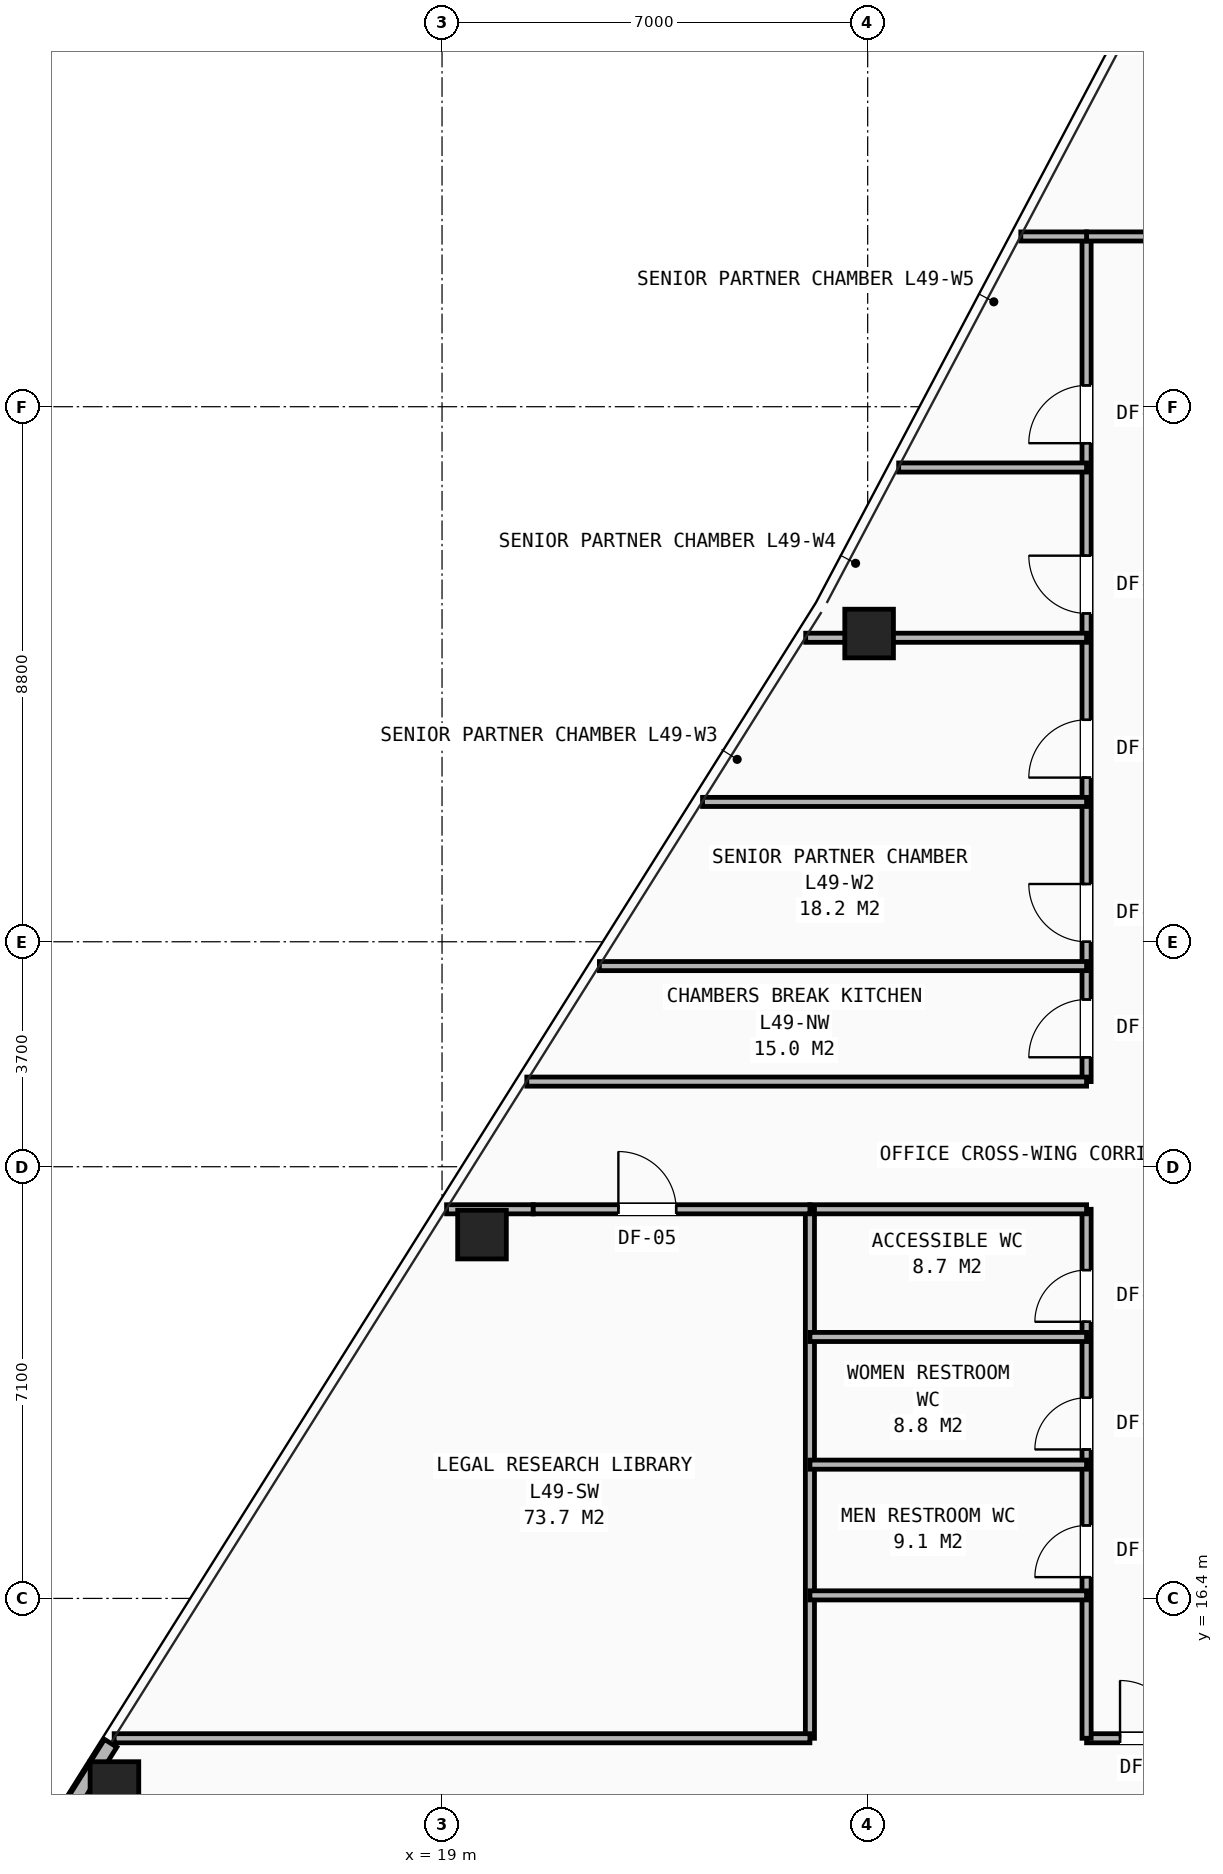
"""IFC4 building model, lengths in metres.
Left out: names, types, materials, properties, quantities, classifications, styles, units other than length and angle.
Written with IfcOpenShell. Run it as: python <this file> out.ifc"""

import sys

from ifc_helpers import new_model, si_unit, direction, frame, frame_2d, origin, origin_2d, place, context, subcontext, project, spatial, rectangle, hollow_rectangle, extrude, element, fill, save


model = new_model("IFC4")
c1 = context("Model", 3, precision=1e-05, world=origin(), true_north=direction((0.0, 1.0)))
c2 = subcontext(c1, "Body", "Model", "MODEL_VIEW")
j1 = project(units=[si_unit("LENGTHUNIT", "METRE"), si_unit("PLANEANGLEUNIT", "RADIAN")], contexts=[c1])
p1 = place(None, origin())
s1 = spatial("IfcSite", under=j1, at=p1, CompositionType="ELEMENT")
p2 = place(p1, origin())
s2 = spatial("IfcBuilding", under=s1, at=p2, CompositionType="ELEMENT")
p3 = place(p2, frame((0.0, 0.0, 172.35)))
s3 = spatial("IfcBuildingStorey", under=s2, at=p3, CompositionType="ELEMENT", Elevation=172.35)
for number, where, z_axis, x_axis in (
    (1, (26.024, 32.269, 0.0), (0.0, 0.0, 1.0), (1.0, 0.0, 0.0)),
    (2, (19.657, 22.384, 0.0), (0.0, 0.0, 1.0), (1.0, 0.0, 0.0)),
    (3, (13.612, 13.314, 0.0), (0.0, 0.0, 1.0), (1.0, 0.0, 0.0)),
):
    element("IfcColumn", number, at=place(p3, frame(where, z_axis=z_axis, x_axis=x_axis)), inside=s3, PredefinedType="COLUMN", context=c2, shape_type="SweptSolid", body=[
        extrude(hollow_rectangle(XDim=0.8, YDim=0.8, WallThickness=0.055, at=origin_2d()), origin(), (0.0, 0.0, 1.0), 3.45),
    ])
p4 = place(p3, frame((13.551, 14.018, 0.0), z_axis=(0.0, 0.0, 1.0), x_axis=(-0.532008789028, -0.84673883128, 0.0)))
e4 = element("IfcWall", 4, at=p4, inside=s3, PredefinedType="SHEAR", context=c2, shape_type="SweptSolid", body=[
    extrude(rectangle(XDim=1.167, YDim=0.24, at=frame_2d((0.584, 0.0))), origin(), (0.0, 0.0, 1.0), 2.583),
])
p5 = place(p3, frame((29.6, 14.1, 0.0), z_axis=(0.0, 0.0, 1.0), x_axis=(1.0, 0.0, 0.0)))
e5 = element("IfcWall", 5, at=p5, inside=s3, PredefinedType="PARTITIONING", context=c2, shape_type="SweptSolid", body=[
    extrude(rectangle(XDim=18.6, YDim=0.15, at=frame_2d((9.3, 0.0))), origin(), (0.0, 0.0, 1.0), 2.252),
])
p6 = place(p5, frame((0.55, 0.0, 0.0)))
e6 = element("IfcOpeningElement", 6, at=p6, cuts=e5, PredefinedType="OPENING", context=c2, shape_type="SweptSolid", body=[
    extrude(rectangle(XDim=0.95, YDim=2.1, at=frame_2d((0.475, 1.05))), frame((0.0, 0.085, 0.0), z_axis=(0.0, -1.0, 0.0), x_axis=(1.0, 0.0, 0.0)), (0.0, 0.0, 1.0), 0.17),
])
p7 = place(p5, frame((2.25, 0.0, 0.0)))
e7 = element("IfcOpeningElement", 7, at=p7, cuts=e5, PredefinedType="OPENING", context=c2, shape_type="SweptSolid", body=[
    extrude(rectangle(XDim=0.95, YDim=2.1, at=frame_2d((0.475, 1.05))), frame((0.0, 0.085, 0.0), z_axis=(0.0, -1.0, 0.0), x_axis=(1.0, 0.0, 0.0)), (0.0, 0.0, 1.0), 0.17),
])
p8 = place(p5, frame((5.95, 0.0, 0.0)))
e8 = element("IfcOpeningElement", 8, at=p8, cuts=e5, PredefinedType="OPENING", context=c2, shape_type="SweptSolid", body=[
    extrude(rectangle(XDim=0.95, YDim=2.1, at=frame_2d((0.475, 1.05))), frame((0.0, 0.085, 0.0), z_axis=(0.0, -1.0, 0.0), x_axis=(1.0, 0.0, 0.0)), (0.0, 0.0, 1.0), 0.17),
])
p9 = place(p5, frame((9.75, 0.0, 0.0)))
e9 = element("IfcOpeningElement", 9, at=p9, cuts=e5, PredefinedType="OPENING", context=c2, shape_type="SweptSolid", body=[
    extrude(rectangle(XDim=0.95, YDim=2.1, at=frame_2d((0.475, 1.05))), frame((0.0, 0.085, 0.0), z_axis=(0.0, -1.0, 0.0), x_axis=(1.0, 0.0, 0.0)), (0.0, 0.0, 1.0), 0.17),
])
p10 = place(p5, frame((13.55, 0.0, 0.0)))
e10 = element("IfcOpeningElement", 10, at=p10, cuts=e5, PredefinedType="OPENING", context=c2, shape_type="SweptSolid", body=[
    extrude(rectangle(XDim=0.95, YDim=2.1, at=frame_2d((0.475, 1.05))), frame((0.0, 0.085, 0.0), z_axis=(0.0, -1.0, 0.0), x_axis=(1.0, 0.0, 0.0)), (0.0, 0.0, 1.0), 0.17),
])
p11 = place(p5, frame((16.95, 0.0, 0.0)))
e11 = element("IfcOpeningElement", 11, at=p11, cuts=e5, PredefinedType="OPENING", context=c2, shape_type="SweptSolid", body=[
    extrude(rectangle(XDim=0.95, YDim=2.1, at=frame_2d((0.475, 1.05))), frame((0.0, 0.085, 0.0), z_axis=(0.0, -1.0, 0.0), x_axis=(1.0, 0.0, 0.0)), (0.0, 0.0, 1.0), 0.17),
])
p12 = place(p3, frame((29.6, 14.1, 0.0), z_axis=(0.0, 0.0, 1.0), x_axis=(0.0, 1.0, 0.0)))
e12 = element("IfcWall", 12, at=p12, inside=s3, PredefinedType="PARTITIONING", context=c2, shape_type="SweptSolid", body=[
    extrude(rectangle(XDim=8.7, YDim=0.15, at=frame_2d((4.35, 0.0))), origin(), (0.0, 0.0, 1.0), 3.21),
])
p13 = place(p12, frame((2.65, 0.0, 0.0)))
e13 = element("IfcOpeningElement", 13, at=p13, cuts=e12, PredefinedType="OPENING", context=c2, shape_type="SweptSolid", body=[
    extrude(rectangle(XDim=0.85, YDim=2.05, at=frame_2d((0.425, 1.025))), frame((0.0, 0.085, 0.0), z_axis=(0.0, -1.0, 0.0), x_axis=(1.0, 0.0, 0.0)), (0.0, 0.0, 1.0), 0.17),
])
p14 = place(p12, frame((4.75, 0.0, 0.0)))
e14 = element("IfcOpeningElement", 14, at=p14, cuts=e12, PredefinedType="OPENING", context=c2, shape_type="SweptSolid", body=[
    extrude(rectangle(XDim=0.85, YDim=2.05, at=frame_2d((0.425, 1.025))), frame((0.0, 0.085, 0.0), z_axis=(0.0, -1.0, 0.0), x_axis=(1.0, 0.0, 0.0)), (0.0, 0.0, 1.0), 0.17),
])
p15 = place(p12, frame((6.85, 0.0, 0.0)))
e15 = element("IfcOpeningElement", 15, at=p15, cuts=e12, PredefinedType="OPENING", context=c2, shape_type="SweptSolid", body=[
    extrude(rectangle(XDim=0.85, YDim=2.05, at=frame_2d((0.425, 1.025))), frame((0.0, 0.085, 0.0), z_axis=(0.0, -1.0, 0.0), x_axis=(1.0, 0.0, 0.0)), (0.0, 0.0, 1.0), 0.17),
])
p16 = place(p3, frame((29.6, 24.9, 0.0), z_axis=(0.0, 0.0, 1.0), x_axis=(0.0, 1.0, 0.0)))
e16 = element("IfcWall", 16, at=p16, inside=s3, PredefinedType="PARTITIONING", context=c2, shape_type="SweptSolid", body=[
    extrude(rectangle(XDim=13.9, YDim=0.15, at=frame_2d((6.95, 0.0))), origin(), (0.0, 0.0, 1.0), 2.252),
])
p17 = place(p16, frame((0.4, 0.0, 0.0)))
e17 = element("IfcOpeningElement", 17, at=p17, cuts=e16, PredefinedType="OPENING", context=c2, shape_type="SweptSolid", body=[
    extrude(rectangle(XDim=0.95, YDim=2.1, at=frame_2d((0.475, 1.05))), frame((0.0, 0.085, 0.0), z_axis=(0.0, -1.0, 0.0), x_axis=(1.0, 0.0, 0.0)), (0.0, 0.0, 1.0), 0.17),
])
p18 = place(p16, frame((2.3, 0.0, 0.0)))
e18 = element("IfcOpeningElement", 18, at=p18, cuts=e16, PredefinedType="OPENING", context=c2, shape_type="SweptSolid", body=[
    extrude(rectangle(XDim=0.95, YDim=2.1, at=frame_2d((0.475, 1.05))), frame((0.0, 0.085, 0.0), z_axis=(0.0, -1.0, 0.0), x_axis=(1.0, 0.0, 0.0)), (0.0, 0.0, 1.0), 0.17),
])
p19 = place(p16, frame((5.0, 0.0, 0.0)))
e19 = element("IfcOpeningElement", 19, at=p19, cuts=e16, PredefinedType="OPENING", context=c2, shape_type="SweptSolid", body=[
    extrude(rectangle(XDim=0.95, YDim=2.1, at=frame_2d((0.475, 1.05))), frame((0.0, 0.085, 0.0), z_axis=(0.0, -1.0, 0.0), x_axis=(1.0, 0.0, 0.0)), (0.0, 0.0, 1.0), 0.17),
])
p20 = place(p16, frame((7.7, 0.0, 0.0)))
e20 = element("IfcOpeningElement", 20, at=p20, cuts=e16, PredefinedType="OPENING", context=c2, shape_type="SweptSolid", body=[
    extrude(rectangle(XDim=0.95, YDim=2.1, at=frame_2d((0.475, 1.05))), frame((0.0, 0.085, 0.0), z_axis=(0.0, -1.0, 0.0), x_axis=(1.0, 0.0, 0.0)), (0.0, 0.0, 1.0), 0.17),
])
p21 = place(p16, frame((10.5, 0.0, 0.0)))
e21 = element("IfcOpeningElement", 21, at=p21, cuts=e16, PredefinedType="OPENING", context=c2, shape_type="SweptSolid", body=[
    extrude(rectangle(XDim=0.95, YDim=2.1, at=frame_2d((0.475, 1.05))), frame((0.0, 0.085, 0.0), z_axis=(0.0, -1.0, 0.0), x_axis=(1.0, 0.0, 0.0)), (0.0, 0.0, 1.0), 0.17),
])
p22 = place(p3, frame((29.6, 38.8, 0.0), z_axis=(0.0, 0.0, 1.0), x_axis=(1.0, 0.0, 0.0)))
e22 = element("IfcWall", 22, at=p22, inside=s3, PredefinedType="PARTITIONING", context=c2, shape_type="SweptSolid", body=[
    extrude(rectangle(XDim=2.2, YDim=0.15, at=frame_2d((1.1, 0.0))), origin(), (0.0, 0.0, 1.0), 2.589),
])
p23 = place(p3, frame((19.074, 22.8, 0.0), z_axis=(0.0, 0.0, 1.0), x_axis=(1.0, 0.0, 0.0)))
e23 = element("IfcWall", 23, at=p23, inside=s3, PredefinedType="PARTITIONING", context=c2, shape_type="SweptSolid", body=[
    extrude(rectangle(XDim=1.426, YDim=0.15, at=frame_2d((0.713, 0.0))), origin(), (0.0, 0.0, 1.0), 2.589),
])
p24 = place(p3, frame((25.05, 22.8, 0.0), z_axis=(0.0, 0.0, 1.0), x_axis=(1.0, 0.0, 0.0)))
e24 = element("IfcWall", 24, at=p24, inside=s3, PredefinedType="PARTITIONING", context=c2, shape_type="SweptSolid", body=[
    extrude(rectangle(XDim=4.55, YDim=0.15, at=frame_2d((2.275, 0.0))), origin(), (0.0, 0.0, 1.0), 3.21),
])
p25 = place(p3, frame((20.394, 24.9, 0.0), z_axis=(0.0, 0.0, 1.0), x_axis=(1.0, 0.0, 0.0)))
e25 = element("IfcWall", 25, at=p25, inside=s3, PredefinedType="PARTITIONING", context=c2, shape_type="SweptSolid", body=[
    extrude(rectangle(XDim=9.206, YDim=0.15, at=frame_2d((4.603, 0.0))), origin(), (0.0, 0.0, 1.0), 2.589),
])
p26 = place(p3, frame((25.05, 14.1, 0.0), z_axis=(0.0, 0.0, 1.0), x_axis=(0.0, 1.0, 0.0)))
e26 = element("IfcWall", 26, at=p26, inside=s3, PredefinedType="PARTITIONING", context=c2, shape_type="SweptSolid", body=[
    extrude(rectangle(XDim=8.7, YDim=0.15, at=frame_2d((4.35, 0.0))), origin(), (0.0, 0.0, 1.0), 3.21),
])
for number, where, z_axis, x_axis in (
    (27, (25.05, 16.45, 0.0), (0.0, 0.0, 1.0), (1.0, 0.0, 0.0)),
    (28, (25.05, 18.6, 0.0), (0.0, 0.0, 1.0), (1.0, 0.0, 0.0)),
    (29, (25.05, 20.7, 0.0), (0.0, 0.0, 1.0), (1.0, 0.0, 0.0)),
):
    element("IfcWall", number, at=place(p3, frame(where, z_axis=z_axis, x_axis=x_axis)), inside=s3, PredefinedType="PARTITIONING", context=c2, shape_type="SweptSolid", body=[
        extrude(rectangle(XDim=4.55, YDim=0.15, at=frame_2d((2.275, 0.0))), origin(), (0.0, 0.0, 1.0), 3.21),
    ])
p27 = place(p3, frame((13.608, 14.1, 0.0), z_axis=(0.0, 0.0, 1.0), x_axis=(1.0, 0.0, 0.0)))
e30 = element("IfcWall", 30, at=p27, inside=s3, PredefinedType="PARTITIONING", context=c2, shape_type="SweptSolid", body=[
    extrude(rectangle(XDim=11.442, YDim=0.15, at=frame_2d((5.721, 0.0))), origin(), (0.0, 0.0, 1.0), 2.589),
])
p28 = place(p3, frame((20.5, 22.8, 0.0), z_axis=(0.0, 0.0, 1.0), x_axis=(1.0, 0.0, 0.0)))
e31 = element("IfcWall", 31, at=p28, inside=s3, PredefinedType="PARTITIONING", context=c2, shape_type="SweptSolid", body=[
    extrude(rectangle(XDim=4.55, YDim=0.15, at=frame_2d((2.275, 0.0))), origin(), (0.0, 0.0, 1.0), 3.21),
])
p29 = place(p28, frame((1.4, 0.0, 0.0)))
e32 = element("IfcOpeningElement", 32, at=p29, cuts=e31, PredefinedType="OPENING", context=c2, shape_type="SweptSolid", body=[
    extrude(rectangle(XDim=0.95, YDim=2.1, at=frame_2d((0.475, 1.05))), frame((0.0, 0.085, 0.0), z_axis=(0.0, -1.0, 0.0), x_axis=(1.0, 0.0, 0.0)), (0.0, 0.0, 1.0), 0.17),
])
p30 = place(p3, frame((28.518, 38.8, 0.0), z_axis=(0.0, 0.0, 1.0), x_axis=(1.0, 0.0, 0.0)))
e33 = element("IfcWall", 33, at=p30, inside=s3, PredefinedType="PARTITIONING", context=c2, shape_type="SweptSolid", body=[
    extrude(rectangle(XDim=1.082, YDim=0.15, at=frame_2d((0.541, 0.0))), origin(), (0.0, 0.0, 1.0), 2.589),
])
p31 = place(p3, frame((21.588, 26.8, 0.0), z_axis=(0.0, 0.0, 1.0), x_axis=(1.0, 0.0, 0.0)))
e34 = element("IfcWall", 34, at=p31, inside=s3, PredefinedType="PARTITIONING", context=c2, shape_type="SweptSolid", body=[
    extrude(rectangle(XDim=8.012, YDim=0.15, at=frame_2d((4.006, 0.0))), origin(), (0.0, 0.0, 1.0), 2.589),
])
p32 = place(p3, frame((23.284, 29.5, 0.0), z_axis=(0.0, 0.0, 1.0), x_axis=(1.0, 0.0, 0.0)))
e35 = element("IfcWall", 35, at=p32, inside=s3, PredefinedType="PARTITIONING", context=c2, shape_type="SweptSolid", body=[
    extrude(rectangle(XDim=6.316, YDim=0.15, at=frame_2d((3.158, 0.0))), origin(), (0.0, 0.0, 1.0), 2.589),
])
p33 = place(p3, frame((24.981, 32.2, 0.0), z_axis=(0.0, 0.0, 1.0), x_axis=(1.0, 0.0, 0.0)))
e36 = element("IfcWall", 36, at=p33, inside=s3, PredefinedType="PARTITIONING", context=c2, shape_type="SweptSolid", body=[
    extrude(rectangle(XDim=4.619, YDim=0.15, at=frame_2d((2.31, 0.0))), origin(), (0.0, 0.0, 1.0), 2.252),
])
p34 = place(p3, frame((26.51, 35.0, 0.0), z_axis=(0.0, 0.0, 1.0), x_axis=(1.0, 0.0, 0.0)))
e37 = element("IfcWall", 37, at=p34, inside=s3, PredefinedType="PARTITIONING", context=c2, shape_type="SweptSolid", body=[
    extrude(rectangle(XDim=3.09, YDim=0.15, at=frame_2d((1.545, 0.0))), origin(), (0.0, 0.0, 1.0), 2.589),
])
p35 = place(p13, origin())
e38 = element("IfcDoor", 38, at=p35, inside=s3, OperationType="SINGLE_SWING_LEFT", PredefinedType="DOOR", context=c2, shape_type="SweptSolid", body=[
    extrude(rectangle(XDim=0.85, YDim=2.05, at=frame_2d((0.425, 1.025))), frame((0.0, 0.025, 0.0), z_axis=(0.0, -1.0, 0.0), x_axis=(1.0, 0.0, 0.0)), (0.0, 0.0, 1.0), 0.05),
])
fill(e13, e38)
p36 = place(p14, origin())
e39 = element("IfcDoor", 39, at=p36, inside=s3, OperationType="SINGLE_SWING_LEFT", PredefinedType="DOOR", context=c2, shape_type="SweptSolid", body=[
    extrude(rectangle(XDim=0.85, YDim=2.05, at=frame_2d((0.425, 1.025))), frame((0.0, 0.025, 0.0), z_axis=(0.0, -1.0, 0.0), x_axis=(1.0, 0.0, 0.0)), (0.0, 0.0, 1.0), 0.05),
])
fill(e14, e39)
p37 = place(p15, origin())
e40 = element("IfcDoor", 40, at=p37, inside=s3, OperationType="SINGLE_SWING_LEFT", PredefinedType="DOOR", context=c2, shape_type="SweptSolid", body=[
    extrude(rectangle(XDim=0.85, YDim=2.05, at=frame_2d((0.425, 1.025))), frame((0.0, 0.025, 0.0), z_axis=(0.0, -1.0, 0.0), x_axis=(1.0, 0.0, 0.0)), (0.0, 0.0, 1.0), 0.05),
])
fill(e15, e40)
p38 = place(p6, origin())
e41 = element("IfcDoor", 41, at=p38, inside=s3, OperationType="SINGLE_SWING_LEFT", PredefinedType="DOOR", context=c2, shape_type="SweptSolid", body=[
    extrude(rectangle(XDim=0.95, YDim=2.1, at=frame_2d((0.475, 1.05))), frame((0.0, 0.025, 0.0), z_axis=(0.0, -1.0, 0.0), x_axis=(1.0, 0.0, 0.0)), (0.0, 0.0, 1.0), 0.05),
])
fill(e6, e41)
p39 = place(p29, origin())
e42 = element("IfcDoor", 42, at=p39, inside=s3, OperationType="SINGLE_SWING_LEFT", PredefinedType="DOOR", context=c2, shape_type="SweptSolid", body=[
    extrude(rectangle(XDim=0.95, YDim=2.1, at=frame_2d((0.475, 1.05))), frame((0.0, 0.025, 0.0), z_axis=(0.0, -1.0, 0.0), x_axis=(1.0, 0.0, 0.0)), (0.0, 0.0, 1.0), 0.05),
])
fill(e32, e42)
p40 = place(p17, origin())
e43 = element("IfcDoor", 43, at=p40, inside=s3, OperationType="SINGLE_SWING_LEFT", PredefinedType="DOOR", context=c2, shape_type="SweptSolid", body=[
    extrude(rectangle(XDim=0.95, YDim=2.1, at=frame_2d((0.475, 1.05))), frame((0.0, 0.025, 0.0), z_axis=(0.0, -1.0, 0.0), x_axis=(1.0, 0.0, 0.0)), (0.0, 0.0, 1.0), 0.05),
])
fill(e17, e43)
p41 = place(p18, origin())
e44 = element("IfcDoor", 44, at=p41, inside=s3, OperationType="SINGLE_SWING_RIGHT", PredefinedType="DOOR", context=c2, shape_type="SweptSolid", body=[
    extrude(rectangle(XDim=0.95, YDim=2.1, at=frame_2d((0.475, 1.05))), frame((0.0, 0.025, 0.0), z_axis=(0.0, -1.0, 0.0), x_axis=(1.0, 0.0, 0.0)), (0.0, 0.0, 1.0), 0.05),
])
fill(e18, e44)
p42 = place(p19, origin())
e45 = element("IfcDoor", 45, at=p42, inside=s3, OperationType="SINGLE_SWING_LEFT", PredefinedType="DOOR", context=c2, shape_type="SweptSolid", body=[
    extrude(rectangle(XDim=0.95, YDim=2.1, at=frame_2d((0.475, 1.05))), frame((0.0, 0.025, 0.0), z_axis=(0.0, -1.0, 0.0), x_axis=(1.0, 0.0, 0.0)), (0.0, 0.0, 1.0), 0.05),
])
fill(e19, e45)
p43 = place(p20, origin())
e46 = element("IfcDoor", 46, at=p43, inside=s3, OperationType="SINGLE_SWING_RIGHT", PredefinedType="DOOR", context=c2, shape_type="SweptSolid", body=[
    extrude(rectangle(XDim=0.95, YDim=2.1, at=frame_2d((0.475, 1.05))), frame((0.0, 0.025, 0.0), z_axis=(0.0, -1.0, 0.0), x_axis=(1.0, 0.0, 0.0)), (0.0, 0.0, 1.0), 0.05),
])
fill(e20, e46)
p44 = place(p21, origin())
e47 = element("IfcDoor", 47, at=p44, inside=s3, OperationType="SINGLE_SWING_LEFT", PredefinedType="DOOR", context=c2, shape_type="SweptSolid", body=[
    extrude(rectangle(XDim=0.95, YDim=2.1, at=frame_2d((0.475, 1.05))), frame((0.0, 0.025, 0.0), z_axis=(0.0, -1.0, 0.0), x_axis=(1.0, 0.0, 0.0)), (0.0, 0.0, 1.0), 0.05),
])
fill(e21, e47)
save(model, sys.argv[1])
